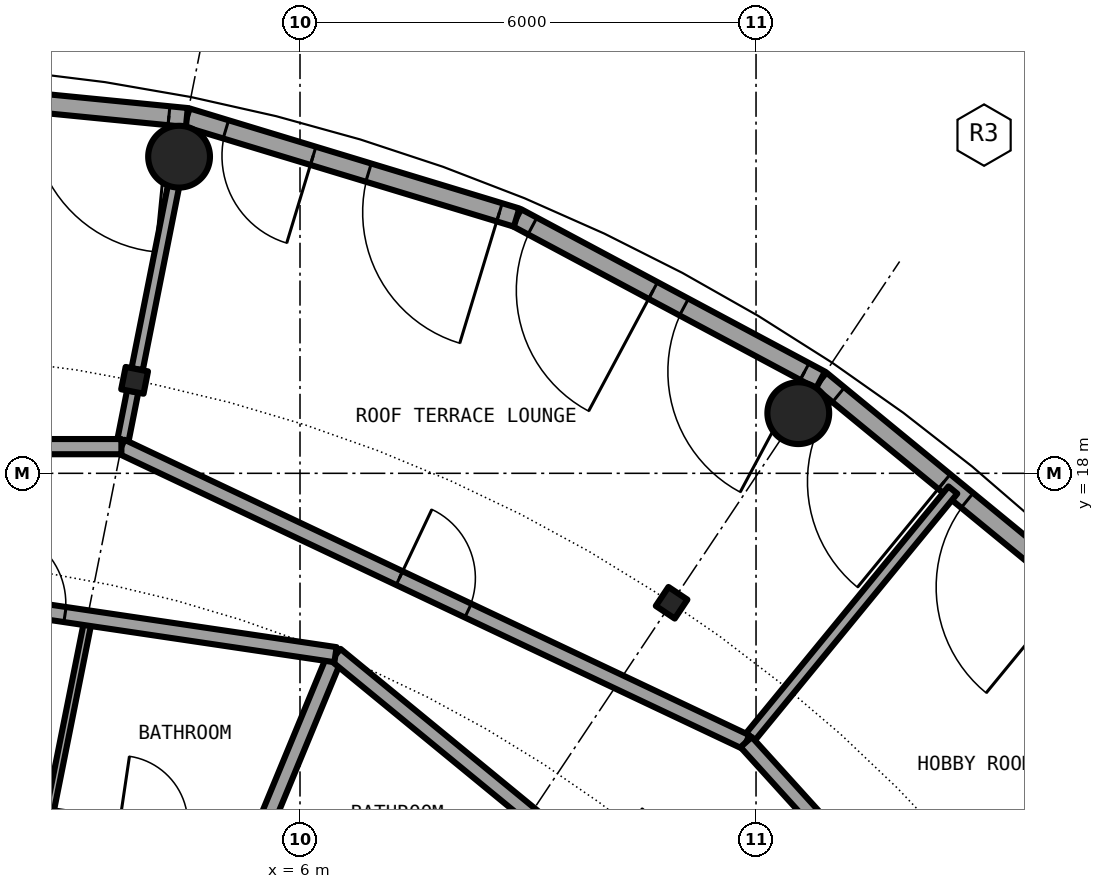
"""IFC4 building model, lengths in metres.
Left out: names, types, materials, properties, quantities, classifications, styles, units other than length and angle.
Written with IfcOpenShell. Run it as: python <this file> out.ifc"""

import sys

from ifc_helpers import new_model, si_unit, direction, frame, frame_2d, origin, origin_2d, place, context, subcontext, project, spatial, rectangle, hollow_circle, i_section, extrude, element, fill, save


model = new_model("IFC4")
c1 = context("Model", 3, precision=1e-05, world=origin(), true_north=direction((0.0, 1.0)))
c2 = subcontext(c1, "Body", "Model", "MODEL_VIEW")
j1 = project(units=[si_unit("LENGTHUNIT", "METRE"), si_unit("PLANEANGLEUNIT", "RADIAN")], contexts=[c1])
p1 = place(None, origin())
s1 = spatial("IfcSite", under=j1, at=p1, CompositionType="ELEMENT")
p2 = place(p1, origin())
s2 = spatial("IfcBuilding", under=s1, at=p2, CompositionType="ELEMENT")
p3 = place(p2, frame((0.0, 0.0, 249.3)))
s3 = spatial("IfcBuildingStorey", under=s2, at=p3, CompositionType="ELEMENT", Elevation=249.3)
for number, where, z_axis, x_axis in (
    (1, (12.556, 18.791, 0.0), (0.0, 0.0, 1.0), (1.0, 0.0, 0.0)),
    (2, (4.409, 22.166, 0.0), (0.0, 0.0, 1.0), (1.0, 0.0, 0.0)),
):
    element("IfcColumn", number, at=place(p3, frame(where, z_axis=z_axis, x_axis=x_axis)), inside=s3, PredefinedType="COLUMN", context=c2, shape_type="SweptSolid", body=[
        extrude(hollow_circle(Radius=0.406, WallThickness=0.03, at=origin_2d()), origin(), (0.0, 0.0, 1.0), 3.05),
    ])
for number, where, z_axis, x_axis in (
    (3, (10.889, 16.297, 0.0), (0.0, 0.0, 1.0), (0.556, 0.831, 0.0)),
    (4, (3.824, 19.223, 0.0), (0.0, 0.0, 1.0), (0.195, 0.981, 0.0)),
):
    element("IfcColumn", number, at=place(p3, frame(where, z_axis=z_axis, x_axis=x_axis)), inside=s3, PredefinedType="COLUMN", context=c2, shape_type="SweptSolid", body=[
        extrude(i_section(OverallWidth=0.3, OverallDepth=0.3, WebThickness=0.011, FlangeThickness=0.019, FilletRadius=0.027, at=origin_2d()), origin(), (0.0, 0.0, 1.0), 3.05),
    ])
p4 = place(p3, frame((16.352, 16.352, 0.0), z_axis=(0.0, 0.0, 1.0), x_axis=(-0.772989395532, 0.634418942337, 0.0)))
e5 = element("IfcWall", 5, at=p4, inside=s3, PredefinedType="SOLIDWALL", context=c2, shape_type="SweptSolid", body=[
    extrude(rectangle(XDim=4.533, YDim=0.25, at=frame_2d((2.267, 0.0))), origin(), (0.0, 0.0, 1.0), 2.7),
])
p5 = place(p4, frame((0.236, 0.0, 0.0)))
e6 = element("IfcOpeningElement", 6, at=p5, cuts=e5, PredefinedType="OPENING", context=c2, shape_type="SweptSolid", body=[
    extrude(rectangle(XDim=1.8, YDim=2.2, at=frame_2d((0.9, 1.1))), frame((0.0, 0.135, 0.0), z_axis=(0.0, -1.0, 0.0), x_axis=(1.0, 0.0, 0.0)), (0.0, 0.0, 1.0), 0.27),
])
p6 = place(p4, frame((2.427, 0.0, 0.0)))
e7 = element("IfcOpeningElement", 7, at=p6, cuts=e5, PredefinedType="OPENING", context=c2, shape_type="SweptSolid", body=[
    extrude(rectangle(XDim=1.8, YDim=2.2, at=frame_2d((0.9, 1.1))), frame((0.0, 0.135, 0.0), z_axis=(0.0, -1.0, 0.0), x_axis=(1.0, 0.0, 0.0)), (0.0, 0.0, 1.0), 0.27),
])
p7 = place(p3, frame((12.848, 19.228, 0.0), z_axis=(0.0, 0.0, 1.0), x_axis=(-0.881912752543, 0.471412660947, 0.0)))
e8 = element("IfcWall", 8, at=p7, inside=s3, PredefinedType="SOLIDWALL", context=c2, shape_type="SweptSolid", body=[
    extrude(rectangle(XDim=4.533, YDim=0.25, at=frame_2d((2.267, 0.0))), origin(), (0.0, 0.0, 1.0), 2.7),
])
p8 = place(p7, frame((0.236, 0.0, 0.0)))
e9 = element("IfcOpeningElement", 9, at=p8, cuts=e8, PredefinedType="OPENING", context=c2, shape_type="SweptSolid", body=[
    extrude(rectangle(XDim=1.8, YDim=2.2, at=frame_2d((0.9, 1.1))), frame((0.0, 0.135, 0.0), z_axis=(0.0, -1.0, 0.0), x_axis=(1.0, 0.0, 0.0)), (0.0, 0.0, 1.0), 0.27),
])
p9 = place(p7, frame((2.497, 0.0, 0.0)))
e10 = element("IfcOpeningElement", 10, at=p9, cuts=e8, PredefinedType="OPENING", context=c2, shape_type="SweptSolid", body=[
    extrude(rectangle(XDim=1.8, YDim=2.2, at=frame_2d((0.9, 1.1))), frame((0.0, 0.135, 0.0), z_axis=(0.0, -1.0, 0.0), x_axis=(1.0, 0.0, 0.0)), (0.0, 0.0, 1.0), 0.27),
])
p10 = place(p3, frame((8.85, 21.365, 0.0), z_axis=(0.0, 0.0, 1.0), x_axis=(-0.956960982965, 0.290216603735, 0.0)))
e11 = element("IfcWall", 11, at=p10, inside=s3, PredefinedType="SOLIDWALL", context=c2, shape_type="SweptSolid", body=[
    extrude(rectangle(XDim=4.534, YDim=0.25, at=frame_2d((2.267, 0.0))), origin(), (0.0, 0.0, 1.0), 2.7),
])
p11 = place(p10, frame((0.236, 0.0, 0.0)))
e12 = element("IfcOpeningElement", 12, at=p11, cuts=e11, PredefinedType="OPENING", context=c2, shape_type="SweptSolid", body=[
    extrude(rectangle(XDim=1.8, YDim=2.2, at=frame_2d((0.9, 1.1))), frame((0.0, 0.135, 0.0), z_axis=(0.0, -1.0, 0.0), x_axis=(1.0, 0.0, 0.0)), (0.0, 0.0, 1.0), 0.27),
])
p12 = place(p10, frame((2.797, 0.0, 0.0)))
e13 = element("IfcOpeningElement", 13, at=p12, cuts=e11, PredefinedType="OPENING", context=c2, shape_type="SweptSolid", body=[
    extrude(rectangle(XDim=1.2, YDim=2.2, at=frame_2d((0.6, 1.1))), frame((0.0, 0.135, 0.0), z_axis=(0.0, -1.0, 0.0), x_axis=(1.0, 0.0, 0.0)), (0.0, 0.0, 1.0), 0.27),
])
p13 = place(p3, frame((4.511, 22.681, 0.0), z_axis=(0.0, 0.0, 1.0), x_axis=(-0.995189063612, 0.097973096645, 0.0)))
e14 = element("IfcWall", 14, at=p13, inside=s3, PredefinedType="SOLIDWALL", context=c2, shape_type="SweptSolid", body=[
    extrude(rectangle(XDim=4.533, YDim=0.25, at=frame_2d((2.266, 0.0))), origin(), (0.0, 0.0, 1.0), 2.7),
])
p14 = place(p13, frame((0.236, 0.0, 0.0)))
e15 = element("IfcOpeningElement", 15, at=p14, cuts=e14, PredefinedType="OPENING", context=c2, shape_type="SweptSolid", body=[
    extrude(rectangle(XDim=1.8, YDim=2.2, at=frame_2d((0.9, 1.1))), frame((0.0, 0.135, 0.0), z_axis=(0.0, -1.0, 0.0), x_axis=(1.0, 0.0, 0.0)), (0.0, 0.0, 1.0), 0.27),
])
p15 = place(p13, frame((2.497, 0.0, 0.0)))
e16 = element("IfcOpeningElement", 16, at=p15, cuts=e14, PredefinedType="OPENING", context=c2, shape_type="SweptSolid", body=[
    extrude(rectangle(XDim=1.8, YDim=2.2, at=frame_2d((0.9, 1.1))), frame((0.0, 0.135, 0.0), z_axis=(0.0, -1.0, 0.0), x_axis=(1.0, 0.0, 0.0)), (0.0, 0.0, 1.0), 0.27),
])
p16 = place(p3, frame((2.704, 13.524, 0.0), z_axis=(0.0, 0.0, 1.0), x_axis=(0.195937128464, 0.980616460034, 0.0)))
e17 = element("IfcWall", 17, at=p16, inside=s3, PredefinedType="PARTITIONING", context=c2, shape_type="SweptSolid", body=[
    extrude(rectangle(XDim=2.623, YDim=0.1, at=frame_2d((1.312, 0.0))), origin(), (0.0, 0.0, 1.0), 2.7),
])
p17 = place(p3, frame((2.955, 7.132, 0.0), z_axis=(0.0, 0.0, 1.0), x_axis=(0.382556139466, 0.923932248683, 0.0)))
e18 = element("IfcWall", 18, at=p17, inside=s3, PredefinedType="PARTITIONING", context=c2, shape_type="SweptSolid", body=[
    extrude(rectangle(XDim=9.18, YDim=0.2, at=frame_2d((4.59, 0.0))), origin(), (0.0, 0.0, 1.0), 2.7),
])
p18 = place(p3, frame((3.654, 18.35, 0.0), z_axis=(0.0, 0.0, 1.0), x_axis=(0.194656627734, 0.980871447887, 0.0)))
e19 = element("IfcWall", 19, at=p18, inside=s3, PredefinedType="PARTITIONING", context=c2, shape_type="SweptSolid", body=[
    extrude(rectangle(XDim=0.74, YDim=0.15, at=frame_2d((0.37, 0.0))), origin(), (0.0, 0.0, 1.0), 2.7),
])
p19 = place(p3, frame((3.857, 19.37, 0.0), z_axis=(0.0, 0.0, 1.0), x_axis=(0.195043256877, 0.980794641068, 0.0)))
e20 = element("IfcWall", 20, at=p19, inside=s3, PredefinedType="PARTITIONING", context=c2, shape_type="SweptSolid", body=[
    extrude(rectangle(XDim=2.451, YDim=0.15, at=frame_2d((1.226, 0.0))), origin(), (0.0, 0.0, 1.0), 2.7),
])
p20 = place(p3, frame((11.87, 14.464, 0.0), z_axis=(0.0, 0.0, 1.0), x_axis=(0.634207563301, 0.773162833206, 0.0)))
e21 = element("IfcWall", 21, at=p20, inside=s3, PredefinedType="PARTITIONING", context=c2, shape_type="SweptSolid", body=[
    extrude(rectangle(XDim=4.289, YDim=0.15, at=frame_2d((2.145, 0.0))), origin(), (0.0, 0.0, 1.0), 2.7),
])
p21 = place(p3, frame((6.47, 15.613, 0.0), z_axis=(0.0, 0.0, 1.0), x_axis=(0.77292501819, -0.634497372931, 0.0)))
e22 = element("IfcWall", 22, at=p21, inside=s3, PredefinedType="PARTITIONING", context=c2, shape_type="SweptSolid", body=[
    extrude(rectangle(XDim=9.81, YDim=0.2, at=frame_2d((4.905, 0.0))), origin(), (0.0, 0.0, 1.0), 2.7),
])
p22 = place(p21, frame((4.404, 0.0, 0.0)))
e23 = element("IfcOpeningElement", 23, at=p22, cuts=e22, PredefinedType="OPENING", context=c2, shape_type="SweptSolid", body=[
    extrude(rectangle(XDim=1.0, YDim=2.3, at=frame_2d((0.5, 1.15))), frame((0.0, 0.11, 0.0), z_axis=(0.0, -1.0, 0.0), x_axis=(1.0, 0.0, 0.0)), (0.0, 0.0, 1.0), 0.22),
])
p23 = place(p3, frame((-1.656, 16.819, 0.0), z_axis=(0.0, 0.0, 1.0), x_axis=(0.989174071716, -0.146746910856, 0.0)))
e24 = element("IfcWall", 24, at=p23, inside=s3, PredefinedType="PARTITIONING", context=c2, shape_type="SweptSolid", body=[
    extrude(rectangle(XDim=8.212, YDim=0.2, at=frame_2d((4.106, 0.0))), origin(), (0.0, 0.0, 1.0), 2.7),
])
p24 = place(p23, frame((3.614, 0.0, 0.0)))
e25 = element("IfcOpeningElement", 25, at=p24, cuts=e24, PredefinedType="OPENING", context=c2, shape_type="SweptSolid", body=[
    extrude(rectangle(XDim=1.0, YDim=2.3, at=frame_2d((0.5, 1.15))), frame((0.0, 0.11, 0.0), z_axis=(0.0, -1.0, 0.0), x_axis=(1.0, 0.0, 0.0)), (0.0, 0.0, 1.0), 0.22),
])
p25 = place(p3, frame((3.65, 18.351, 0.0), z_axis=(0.0, 0.0, 1.0), x_axis=(0.904027935406, -0.427473381634, 0.0)))
e26 = element("IfcWall", 26, at=p25, inside=s3, PredefinedType="PARTITIONING", context=c2, shape_type="SweptSolid", body=[
    extrude(rectangle(XDim=9.093, YDim=0.2, at=frame_2d((4.546, 0.0))), origin(), (0.0, 0.0, 1.0), 2.7),
])
p26 = place(p25, frame((4.046, 0.0, 0.0)))
e27 = element("IfcOpeningElement", 27, at=p26, cuts=e26, PredefinedType="OPENING", context=c2, shape_type="SweptSolid", body=[
    extrude(rectangle(XDim=1.0, YDim=2.3, at=frame_2d((0.5, 1.15))), frame((0.0, 0.11, 0.0), z_axis=(0.0, -1.0, 0.0), x_axis=(1.0, 0.0, 0.0)), (0.0, 0.0, 1.0), 0.22),
])
p27 = place(p3, frame((-3.65, 18.351, 0.0), z_axis=(0.0, 0.0, 1.0), x_axis=(1.0, 0.0, 0.0)))
e28 = element("IfcWall", 28, at=p27, inside=s3, PredefinedType="PARTITIONING", context=c2, shape_type="SweptSolid", body=[
    extrude(rectangle(XDim=7.3, YDim=0.2, at=frame_2d((3.65, 0.0))), origin(), (0.0, 0.0, 1.0), 2.7),
])
p28 = place(p27, frame((3.15, 0.0, 0.0)))
e29 = element("IfcOpeningElement", 29, at=p28, cuts=e28, PredefinedType="OPENING", context=c2, shape_type="SweptSolid", body=[
    extrude(rectangle(XDim=1.0, YDim=2.3, at=frame_2d((0.5, 1.15))), frame((0.0, 0.11, 0.0), z_axis=(0.0, -1.0, 0.0), x_axis=(1.0, 0.0, 0.0)), (0.0, 0.0, 1.0), 0.22),
])
p29 = place(p3, frame((11.87, 14.464, 0.0), z_axis=(0.0, 0.0, 1.0), x_axis=(0.671434738137, -0.741063689856, 0.0)))
e30 = element("IfcWall", 30, at=p29, inside=s3, PredefinedType="PARTITIONING", context=c2, shape_type="SweptSolid", body=[
    extrude(rectangle(XDim=5.491, YDim=0.2, at=frame_2d((2.746, 0.0))), origin(), (0.0, 0.0, 1.0), 2.7),
])
p30 = place(p29, frame((2.245, 0.0, 0.0)))
e31 = element("IfcOpeningElement", 31, at=p30, cuts=e30, PredefinedType="OPENING", context=c2, shape_type="SweptSolid", body=[
    extrude(rectangle(XDim=1.0, YDim=2.3, at=frame_2d((0.5, 1.15))), frame((0.0, 0.11, 0.0), z_axis=(0.0, -1.0, 0.0), x_axis=(1.0, 0.0, 0.0)), (0.0, 0.0, 1.0), 0.22),
])
p31 = place(p5, origin())
e32 = element("IfcDoor", 32, at=p31, inside=s3, OperationType="SINGLE_SWING_LEFT", PredefinedType="DOOR", context=c2, shape_type="SweptSolid", body=[
    extrude(rectangle(XDim=1.8, YDim=2.2, at=frame_2d((0.9, 1.1))), frame((0.0, 0.025, 0.0), z_axis=(0.0, -1.0, 0.0), x_axis=(1.0, 0.0, 0.0)), (0.0, 0.0, 1.0), 0.05),
])
fill(e6, e32)
p32 = place(p6, origin())
e33 = element("IfcDoor", 33, at=p32, inside=s3, OperationType="SINGLE_SWING_LEFT", PredefinedType="DOOR", context=c2, shape_type="SweptSolid", body=[
    extrude(rectangle(XDim=1.8, YDim=2.2, at=frame_2d((0.9, 1.1))), frame((0.0, 0.025, 0.0), z_axis=(0.0, -1.0, 0.0), x_axis=(1.0, 0.0, 0.0)), (0.0, 0.0, 1.0), 0.05),
])
fill(e7, e33)
p33 = place(p8, origin())
e34 = element("IfcDoor", 34, at=p33, inside=s3, OperationType="SINGLE_SWING_LEFT", PredefinedType="DOOR", context=c2, shape_type="SweptSolid", body=[
    extrude(rectangle(XDim=1.8, YDim=2.2, at=frame_2d((0.9, 1.1))), frame((0.0, 0.025, 0.0), z_axis=(0.0, -1.0, 0.0), x_axis=(1.0, 0.0, 0.0)), (0.0, 0.0, 1.0), 0.05),
])
fill(e9, e34)
p34 = place(p9, origin())
e35 = element("IfcDoor", 35, at=p34, inside=s3, OperationType="SINGLE_SWING_LEFT", PredefinedType="DOOR", context=c2, shape_type="SweptSolid", body=[
    extrude(rectangle(XDim=1.8, YDim=2.2, at=frame_2d((0.9, 1.1))), frame((0.0, 0.025, 0.0), z_axis=(0.0, -1.0, 0.0), x_axis=(1.0, 0.0, 0.0)), (0.0, 0.0, 1.0), 0.05),
])
fill(e10, e35)
p35 = place(p11, origin())
e36 = element("IfcDoor", 36, at=p35, inside=s3, OperationType="SINGLE_SWING_LEFT", PredefinedType="DOOR", context=c2, shape_type="SweptSolid", body=[
    extrude(rectangle(XDim=1.8, YDim=2.2, at=frame_2d((0.9, 1.1))), frame((0.0, 0.025, 0.0), z_axis=(0.0, -1.0, 0.0), x_axis=(1.0, 0.0, 0.0)), (0.0, 0.0, 1.0), 0.05),
])
fill(e12, e36)
p36 = place(p12, origin())
e37 = element("IfcDoor", 37, at=p36, inside=s3, OperationType="SINGLE_SWING_LEFT", PredefinedType="DOOR", context=c2, shape_type="SweptSolid", body=[
    extrude(rectangle(XDim=1.2, YDim=2.2, at=frame_2d((0.6, 1.1))), frame((0.0, 0.025, 0.0), z_axis=(0.0, -1.0, 0.0), x_axis=(1.0, 0.0, 0.0)), (0.0, 0.0, 1.0), 0.05),
])
fill(e13, e37)
p37 = place(p14, origin())
e38 = element("IfcDoor", 38, at=p37, inside=s3, OperationType="SINGLE_SWING_LEFT", PredefinedType="DOOR", context=c2, shape_type="SweptSolid", body=[
    extrude(rectangle(XDim=1.8, YDim=2.2, at=frame_2d((0.9, 1.1))), frame((0.0, 0.025, 0.0), z_axis=(0.0, -1.0, 0.0), x_axis=(1.0, 0.0, 0.0)), (0.0, 0.0, 1.0), 0.05),
])
fill(e15, e38)
p38 = place(p26, origin())
e39 = element("IfcDoor", 39, at=p38, inside=s3, OperationType="SINGLE_SWING_RIGHT", PredefinedType="DOOR", context=c2, shape_type="SweptSolid", body=[
    extrude(rectangle(XDim=1.0, YDim=2.3, at=frame_2d((0.5, 1.15))), frame((0.0, 0.025, 0.0), z_axis=(0.0, -1.0, 0.0), x_axis=(1.0, 0.0, 0.0)), (0.0, 0.0, 1.0), 0.05),
])
fill(e27, e39)
p39 = place(p24, origin())
e40 = element("IfcDoor", 40, at=p39, inside=s3, OperationType="SINGLE_SWING_RIGHT", PredefinedType="DOOR", context=c2, shape_type="SweptSolid", body=[
    extrude(rectangle(XDim=1.0, YDim=2.3, at=frame_2d((0.5, 1.15))), frame((0.0, 0.025, 0.0), z_axis=(0.0, -1.0, 0.0), x_axis=(1.0, 0.0, 0.0)), (0.0, 0.0, 1.0), 0.05),
])
fill(e25, e40)
save(model, sys.argv[1])
